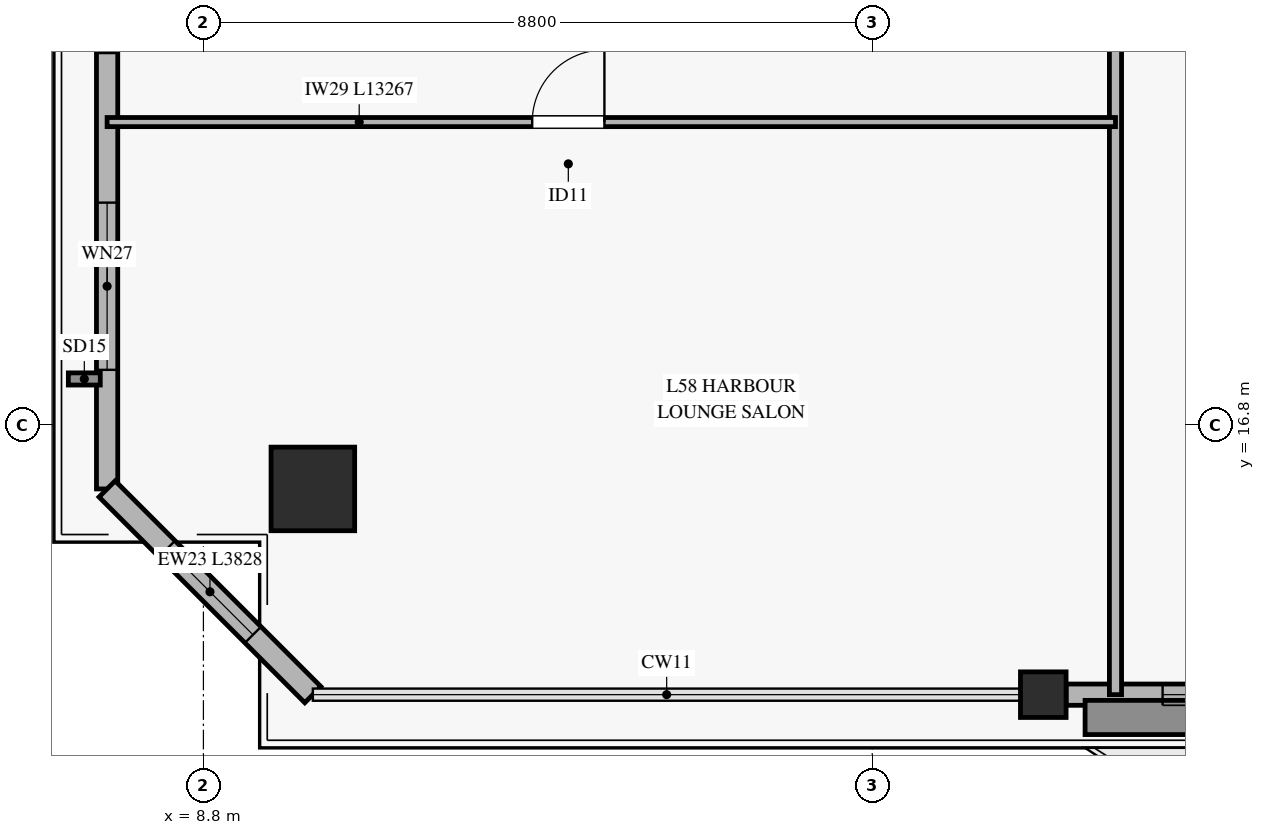
"""IFC4 building model, lengths in metres.
Left out: names, types, materials, properties, quantities, classifications, styles, units other than length and angle.
Written with IfcOpenShell. Run it as: python <this file> out.ifc"""

import sys

from ifc_helpers import new_model, si_unit, direction, frame, frame_2d, origin, origin_2d, place, context, subcontext, project, spatial, rectangle, hollow_rectangle, extrude, source, transform, mapped, element, fill, save


model = new_model("IFC4")
c1 = context("Model", 3, precision=1e-05, world=origin(), true_north=direction((0.0, 1.0)))
c2 = subcontext(c1, "Body", "Model", "MODEL_VIEW")
j1 = project(units=[si_unit("LENGTHUNIT", "METRE"), si_unit("PLANEANGLEUNIT", "RADIAN")], contexts=[c1])
p1 = place(None, origin())
s1 = spatial("IfcSite", under=j1, at=p1, CompositionType="ELEMENT")
p2 = place(p1, origin())
s2 = spatial("IfcBuilding", under=s1, at=p2, CompositionType="ELEMENT")
p3 = place(p2, frame((0.0, 0.0, 230.4)))
s3 = spatial("IfcBuildingStorey", under=s2, at=p3, CompositionType="ELEMENT", Elevation=230.4)
m1 = source(origin(), c2, "Body", "SweptSolid", [
    extrude(hollow_rectangle(XDim=1.1, YDim=1.1, WallThickness=0.05, at=origin_2d()), origin(), (0.0, 0.0, 1.0), 3.185),
])
p4 = place(p3, frame((10.24, 15.957, 0.0), z_axis=(0.0, 0.0, 1.0), x_axis=(1.0, 0.0, 0.0)))
e1 = element("IfcColumn", 1, at=p4, inside=s3, PredefinedType="COLUMN", context=c2, shape_type="MappedRepresentation", body=[
    mapped(m1, transform((0.0, 0.0, 0.0), x_axis=(1.0, 0.0, 0.0), y_axis=(0.0, 1.0, 0.0), z_axis=(0.0, 0.0, 1.0), scale=1.0)),
])
m2 = source(origin(), c2, "Body", "SweptSolid", [
    extrude(hollow_rectangle(XDim=0.6, YDim=0.6, WallThickness=0.028, at=origin_2d()), origin(), (0.0, 0.0, 1.0), 3.185),
])
p5 = place(p3, frame((19.85, 13.25, 0.0), z_axis=(0.0, 0.0, 1.0), x_axis=(1.0, 0.0, 0.0)))
e2 = element("IfcColumn", 2, at=p5, inside=s3, PredefinedType="COLUMN", context=c2, shape_type="MappedRepresentation", body=[
    mapped(m2, transform((0.0, 0.0, 0.0), x_axis=(1.0, 0.0, 0.0), y_axis=(0.0, 1.0, 0.0), z_axis=(0.0, 0.0, 1.0), scale=1.0)),
])
p6 = place(p3, frame((20.15, 13.25, 0.0), z_axis=(0.0, 0.0, 1.0), x_axis=(1.0, 0.0, 0.0)))
e3 = element("IfcWall", 3, at=p6, inside=s3, PredefinedType="SOLIDWALL", context=c2, shape_type="SweptSolid", body=[
    extrude(rectangle(XDim=10.35, YDim=0.28, at=frame_2d((5.175, 0.0))), origin(), (0.0, 0.0, 1.0), 2.815),
])
p7 = place(p6, frame((4.25, 0.0, 0.0)))
e4 = element("IfcOpeningElement", 4, at=p7, cuts=e3, PredefinedType="OPENING", context=c2, shape_type="SweptSolid", body=[
    extrude(rectangle(XDim=1.8, YDim=2.25, at=frame_2d((0.9, 1.125))), frame((0.0, 0.15, 0.0), z_axis=(0.0, -1.0, 0.0), x_axis=(1.0, 0.0, 0.0)), (0.0, 0.0, 1.0), 0.3),
])
p8 = place(p6, frame((1.27, 0.0, 0.45)))
e5 = element("IfcOpeningElement", 5, at=p8, cuts=e3, PredefinedType="OPENING", context=c2, shape_type="SweptSolid", body=[
    extrude(rectangle(XDim=1.6, YDim=2.0, at=frame_2d((0.8, 1.0))), frame((0.0, 0.15, 0.0), z_axis=(0.0, -1.0, 0.0), x_axis=(1.0, 0.0, 0.0)), (0.0, 0.0, 1.0), 0.3),
])
p9 = place(p6, frame((7.35, 0.0, 0.45)))
e6 = element("IfcOpeningElement", 6, at=p9, cuts=e3, PredefinedType="OPENING", context=c2, shape_type="SweptSolid", body=[
    extrude(rectangle(XDim=1.6, YDim=2.0, at=frame_2d((0.8, 1.0))), frame((0.0, 0.15, 0.0), z_axis=(0.0, -1.0, 0.0), x_axis=(1.0, 0.0, 0.0)), (0.0, 0.0, 1.0), 0.3),
])
p10 = place(p3, frame((7.533, 15.957, 0.0), z_axis=(0.0, 0.0, 1.0), x_axis=(0.0, 1.0, 0.0)))
e7 = element("IfcWall", 7, at=p10, inside=s3, PredefinedType="SOLIDWALL", context=c2, shape_type="SweptSolid", body=[
    extrude(rectangle(XDim=13.418, YDim=0.28, at=frame_2d((6.709, 0.0))), origin(), (0.0, 0.0, 1.0), 2.815),
])
p11 = place(p10, frame((1.567, 0.0, 0.45)))
e8 = element("IfcOpeningElement", 8, at=p11, cuts=e7, PredefinedType="OPENING", context=c2, shape_type="SweptSolid", body=[
    extrude(rectangle(XDim=2.2, YDim=2.1, at=frame_2d((1.1, 1.05))), frame((0.0, 0.15, 0.0), z_axis=(0.0, -1.0, 0.0), x_axis=(1.0, 0.0, 0.0)), (0.0, 0.0, 1.0), 0.3),
])
p12 = place(p10, frame((5.735, 0.0, 0.45)))
e9 = element("IfcOpeningElement", 9, at=p12, cuts=e7, PredefinedType="OPENING", context=c2, shape_type="SweptSolid", body=[
    extrude(rectangle(XDim=2.2, YDim=2.1, at=frame_2d((1.1, 1.05))), frame((0.0, 0.15, 0.0), z_axis=(0.0, -1.0, 0.0), x_axis=(1.0, 0.0, 0.0)), (0.0, 0.0, 1.0), 0.3),
])
p13 = place(p3, frame((7.533, 15.957, 0.0), z_axis=(0.0, 0.0, 1.0), x_axis=(0.707106781187, -0.707106781187, 0.0)))
e10 = element("IfcWall", 10, at=p13, inside=s3, PredefinedType="SOLIDWALL", context=c2, shape_type="SweptSolid", body=[
    extrude(rectangle(XDim=3.828, YDim=0.3, at=frame_2d((1.914, 0.0))), origin(), (0.0, 0.0, 1.0), 2.815),
])
p14 = place(p13, frame((1.114, 0.0, 0.45)))
e11 = element("IfcOpeningElement", 11, at=p14, cuts=e10, PredefinedType="OPENING", context=c2, shape_type="SweptSolid", body=[
    extrude(rectangle(XDim=1.6, YDim=2.0, at=frame_2d((0.8, 1.0))), frame((0.0, 0.16, 0.0), z_axis=(0.0, -1.0, 0.0), x_axis=(1.0, 0.0, 0.0)), (0.0, 0.0, 1.0), 0.32),
])
p15 = place(p3, frame((20.8, 13.25, 0.0), z_axis=(0.0, 0.0, 1.0), x_axis=(0.0, 1.0, 0.0)))
e12 = element("IfcWall", 12, at=p15, inside=s3, PredefinedType="PARTITIONING", context=c2, shape_type="SweptSolid", body=[
    extrude(rectangle(XDim=21.85, YDim=0.16, at=frame_2d((10.925, 0.0))), origin(), (0.0, 0.0, 1.0), 2.77),
])
p16 = place(p3, frame((7.533, 20.784, 0.0), z_axis=(0.0, 0.0, 1.0), x_axis=(1.0, 0.0, 0.0)))
e13 = element("IfcWall", 13, at=p16, inside=s3, PredefinedType="PARTITIONING", context=c2, shape_type="SweptSolid", body=[
    extrude(rectangle(XDim=13.267, YDim=0.12, at=frame_2d((6.634, 0.0))), origin(), (0.0, 0.0, 1.0), 2.37),
])
p17 = place(p16, frame((5.593, 0.0, 0.0)))
e14 = element("IfcOpeningElement", 14, at=p17, cuts=e13, PredefinedType="OPENING", context=c2, shape_type="SweptSolid", body=[
    extrude(rectangle(XDim=0.95, YDim=2.1, at=frame_2d((0.475, 1.05))), frame((0.0, 0.07, 0.0), z_axis=(0.0, -1.0, 0.0), x_axis=(1.0, 0.0, 0.0)), (0.0, 0.0, 1.0), 0.14),
])
m3 = source(origin(), c2, "Body", "SweptSolid", [
    extrude(rectangle(XDim=1.6, YDim=2.0, at=frame_2d((0.8, 1.0))), frame((0.0, 0.03, 0.0), z_axis=(0.0, -1.0, 0.0), x_axis=(1.0, 0.0, 0.0)), (0.0, 0.0, 1.0), 0.06),
])
p18 = place(p8, origin())
e15 = element("IfcWindow", 15, at=p18, inside=s3, PartitioningType="SINGLE_PANEL", PredefinedType="WINDOW", context=c2, shape_type="MappedRepresentation", body=[
    mapped(m3, transform((0.0, 0.0, 0.0), x_axis=(1.0, 0.0, 0.0), y_axis=(0.0, 1.0, 0.0), z_axis=(0.0, 0.0, 1.0), scale=1.0)),
])
fill(e5, e15)
m4 = source(origin(), c2, "Body", "SweptSolid", [
    extrude(rectangle(XDim=2.2, YDim=2.1, at=frame_2d((1.1, 1.05))), frame((0.0, 0.03, 0.0), z_axis=(0.0, -1.0, 0.0), x_axis=(1.0, 0.0, 0.0)), (0.0, 0.0, 1.0), 0.06),
])
p19 = place(p11, origin())
e16 = element("IfcWindow", 16, at=p19, inside=s3, PartitioningType="SINGLE_PANEL", PredefinedType="WINDOW", context=c2, shape_type="MappedRepresentation", body=[
    mapped(m4, transform((0.0, 0.0, 0.0), x_axis=(1.0, 0.0, 0.0), y_axis=(0.0, 1.0, 0.0), z_axis=(0.0, 0.0, 1.0), scale=1.0)),
])
fill(e8, e16)
p20 = place(p12, origin())
e17 = element("IfcWindow", 17, at=p20, inside=s3, PartitioningType="SINGLE_PANEL", PredefinedType="WINDOW", context=c2, shape_type="MappedRepresentation", body=[
    mapped(m4, transform((0.0, 0.0, 0.0), x_axis=(1.0, 0.0, 0.0), y_axis=(0.0, 1.0, 0.0), z_axis=(0.0, 0.0, 1.0), scale=1.0)),
])
fill(e9, e17)
p21 = place(p14, origin())
e18 = element("IfcWindow", 18, at=p21, inside=s3, PartitioningType="SINGLE_PANEL", PredefinedType="WINDOW", context=c2, shape_type="MappedRepresentation", body=[
    mapped(m3, transform((0.0, 0.0, 0.0), x_axis=(1.0, 0.0, 0.0), y_axis=(0.0, 1.0, 0.0), z_axis=(0.0, 0.0, 1.0), scale=1.0)),
])
fill(e11, e18)
m5 = source(origin(), c2, "Body", "SweptSolid", [
    extrude(rectangle(XDim=0.95, YDim=2.1, at=frame_2d((0.475, 1.05))), frame((0.0, 0.025, 0.0), z_axis=(0.0, -1.0, 0.0), x_axis=(1.0, 0.0, 0.0)), (0.0, 0.0, 1.0), 0.05),
])
p22 = place(p17, origin())
e19 = element("IfcDoor", 19, at=p22, inside=s3, OperationType="SINGLE_SWING_RIGHT", PredefinedType="DOOR", context=c2, shape_type="MappedRepresentation", body=[
    mapped(m5, transform((0.0, 0.0, 0.0), x_axis=(1.0, 0.0, 0.0), y_axis=(0.0, 1.0, 0.0), z_axis=(0.0, 0.0, 1.0), scale=1.0)),
])
fill(e14, e19)
save(model, sys.argv[1])
